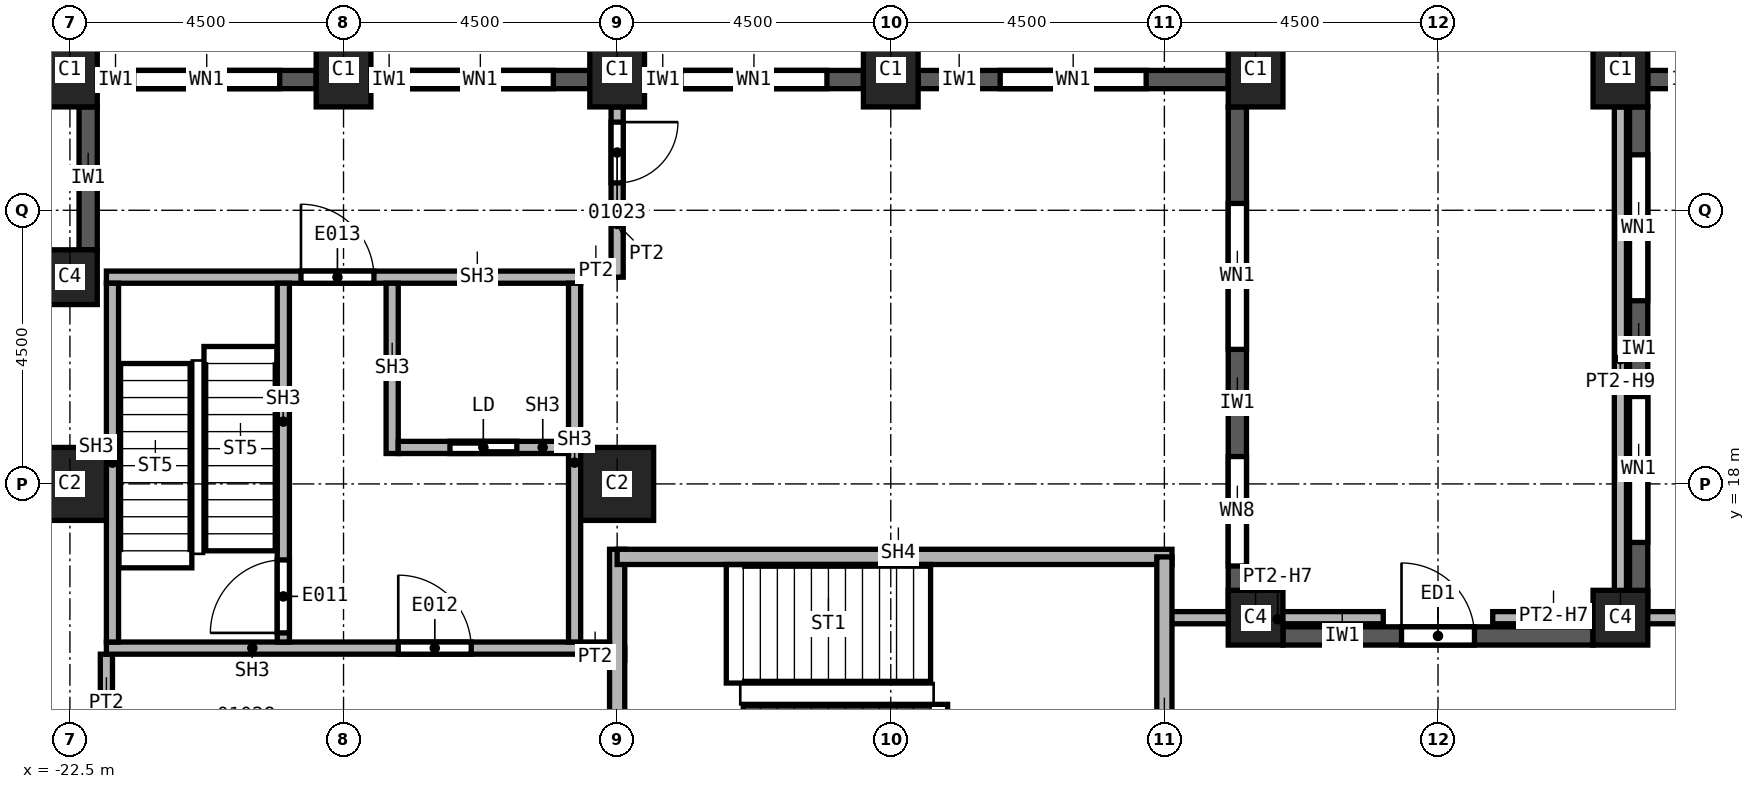
"""IFC4 building model, lengths in metres.
Left out: names, types, materials, properties, quantities, classifications, styles, units other than length and angle.
Written with IfcOpenShell. Run it as: python <this file> out.ifc"""

import sys

from ifc_helpers import new_model, si_unit, direction, frame, frame_2d, origin, origin_2d, place, context, subcontext, project, spatial, rectangle, extrude, element, fill, save


model = new_model("IFC4")
c1 = context("Model", 3, precision=1e-05, world=origin(), true_north=direction((0.0, 1.0)))
c2 = subcontext(c1, "Body", "Model", "MODEL_VIEW")
j1 = project(units=[si_unit("LENGTHUNIT", "METRE"), si_unit("PLANEANGLEUNIT", "RADIAN")], contexts=[c1])
p1 = place(None, origin())
s1 = spatial("IfcSite", under=j1, at=p1, CompositionType="ELEMENT")
p2 = place(p1, origin())
s2 = spatial("IfcBuilding", under=s1, at=p2, CompositionType="ELEMENT")
p3 = place(p2, frame((0.0, 0.0, 68.0)))
s3 = spatial("IfcBuildingStorey", under=s2, at=p3, CompositionType="ELEMENT", Elevation=68.0)
for number, where, z_axis, x_axis in (
    (1, (-13.5, 18.0, 0.0), (0.0, 0.0, 1.0), (1.0, 0.0, 0.0)),
    (2, (-22.5, 18.0, 0.0), (0.0, 0.0, 1.0), (1.0, 0.0, 0.0)),
):
    element("IfcColumn", number, at=place(p3, frame(where, z_axis=z_axis, x_axis=x_axis)), inside=s3, PredefinedType="COLUMN", context=c2, shape_type="SweptSolid", body=[
        extrude(rectangle(XDim=1.2, YDim=1.2, at=origin_2d()), origin(), (0.0, 0.0, 1.0), 3.7),
    ])
for number, where, z_axis, x_axis in (
    (3, (3.0, 24.8, 0.0), (0.0, 0.0, 1.0), (1.0, 0.0, 0.0)),
    (4, (-3.0, 24.8, 0.0), (0.0, 0.0, 1.0), (1.0, 0.0, 0.0)),
    (5, (-9.0, 24.8, 0.0), (0.0, 0.0, 1.0), (1.0, 0.0, 0.0)),
    (6, (-13.5, 24.8, 0.0), (0.0, 0.0, 1.0), (1.0, 0.0, 0.0)),
    (7, (-18.0, 24.8, 0.0), (0.0, 0.0, 1.0), (1.0, 0.0, 0.0)),
    (8, (-22.5, 24.8, 0.0), (0.0, 0.0, 1.0), (1.0, 0.0, 0.0)),
):
    element("IfcColumn", number, at=place(p3, frame(where, z_axis=z_axis, x_axis=x_axis)), inside=s3, PredefinedType="COLUMN", context=c2, shape_type="SweptSolid", body=[
        extrude(rectangle(XDim=0.9, YDim=1.2, at=origin_2d()), origin(), (0.0, 0.0, 1.0), 3.7),
    ])
for number, where, z_axis, x_axis in (
    (9, (3.0, 15.8, 0.0), (0.0, 0.0, 1.0), (1.0, 0.0, 0.0)),
    (10, (-3.0, 15.8, 0.0), (0.0, 0.0, 1.0), (1.0, 0.0, 0.0)),
    (11, (-22.5, 21.4, 0.0), (0.0, 0.0, 1.0), (1.0, 0.0, 0.0)),
):
    element("IfcColumn", number, at=place(p3, frame(where, z_axis=z_axis, x_axis=x_axis)), inside=s3, PredefinedType="COLUMN", context=c2, shape_type="SweptSolid", body=[
        extrude(rectangle(XDim=0.9, YDim=0.9, at=origin_2d()), origin(), (0.0, 0.0, 1.0), 3.7),
    ])
p4 = place(p3, frame((-22.2, 24.2, 0.0), z_axis=(0.0, 0.0, 1.0), x_axis=(0.0, -1.0, 0.0)))
e12 = element("IfcWall", 12, at=p4, inside=s3, PredefinedType="SOLIDWALL", context=c2, shape_type="SweptSolid", body=[
    extrude(rectangle(XDim=2.35, YDim=0.3, at=frame_2d((1.175, 0.0))), origin(), (0.0, 0.0, 1.0), 3.1),
])
p5 = place(p3, frame((8.55, 24.65, 0.0), z_axis=(0.0, 0.0, 1.0), x_axis=(-1.0, 0.0, 0.0)))
e13 = element("IfcWall", 13, at=p5, inside=s3, PredefinedType="SOLIDWALL", context=c2, shape_type="SweptSolid", body=[
    extrude(rectangle(XDim=5.1, YDim=0.3, at=frame_2d((2.55, 0.0))), origin(), (0.0, 0.0, 1.0), 3.1),
])
p6 = place(p5, frame((1.35, 0.0, 0.8)))
e14 = element("IfcOpeningElement", 14, at=p6, cuts=e13, PredefinedType="OPENING", context=c2, shape_type="SweptSolid", body=[
    extrude(rectangle(XDim=2.4, YDim=1.95, at=frame_2d((1.2, 0.975))), frame((0.0, 0.15, 0.0), z_axis=(0.0, -1.0, 0.0), x_axis=(1.0, 0.0, 0.0)), (0.0, 0.0, 1.0), 0.3),
])
p7 = place(p3, frame((3.3, 24.2, 0.0), z_axis=(0.0, 0.0, 1.0), x_axis=(0.0, -1.0, 0.0)))
e15 = element("IfcWall", 15, at=p7, inside=s3, PredefinedType="SOLIDWALL", context=c2, shape_type="SweptSolid", body=[
    extrude(rectangle(XDim=8.35, YDim=0.3, at=frame_2d((4.175, 0.0))), origin(), (0.0, 0.0, 1.0), 3.1),
])
p8 = place(p7, frame((0.788, 0.0, 0.8)))
e16 = element("IfcOpeningElement", 16, at=p8, cuts=e15, PredefinedType="OPENING", context=c2, shape_type="SweptSolid", body=[
    extrude(rectangle(XDim=2.4, YDim=1.95, at=frame_2d((1.2, 0.975))), frame((0.0, 0.15, 0.0), z_axis=(0.0, -1.0, 0.0), x_axis=(1.0, 0.0, 0.0)), (0.0, 0.0, 1.0), 0.3),
])
p9 = place(p7, frame((4.762, 0.0, 0.8)))
e17 = element("IfcOpeningElement", 17, at=p9, cuts=e15, PredefinedType="OPENING", context=c2, shape_type="SweptSolid", body=[
    extrude(rectangle(XDim=2.4, YDim=1.95, at=frame_2d((1.2, 0.975))), frame((0.0, 0.15, 0.0), z_axis=(0.0, -1.0, 0.0), x_axis=(1.0, 0.0, 0.0)), (0.0, 0.0, 1.0), 0.3),
])
p10 = place(p3, frame((-2.55, 15.5, 0.0), z_axis=(0.0, 0.0, 1.0), x_axis=(1.0, 0.0, 0.0)))
e18 = element("IfcWall", 18, at=p10, inside=s3, PredefinedType="SOLIDWALL", context=c2, shape_type="SweptSolid", body=[
    extrude(rectangle(XDim=5.1, YDim=0.3, at=frame_2d((2.55, 0.0))), origin(), (0.0, 0.0, 1.0), 3.1),
])
p11 = place(p10, frame((1.95, 0.0, 0.0)))
e19 = element("IfcOpeningElement", 19, at=p11, cuts=e18, PredefinedType="OPENING", context=c2, shape_type="SweptSolid", body=[
    extrude(rectangle(XDim=1.2, YDim=2.4, at=frame_2d((0.6, 1.2))), frame((0.0, 0.15, 0.0), z_axis=(0.0, -1.0, 0.0), x_axis=(1.0, 0.0, 0.0)), (0.0, 0.0, 1.0), 0.3),
])
p12 = place(p3, frame((-3.3, 15.85, 0.0), z_axis=(0.0, 0.0, 1.0), x_axis=(0.0, 1.0, 0.0)))
e20 = element("IfcWall", 20, at=p12, inside=s3, PredefinedType="SOLIDWALL", context=c2, shape_type="SweptSolid", body=[
    extrude(rectangle(XDim=8.35, YDim=0.3, at=frame_2d((4.175, 0.0))), origin(), (0.0, 0.0, 1.0), 3.1),
])
p13 = place(p12, frame((4.363, 0.0, 0.8)))
e21 = element("IfcOpeningElement", 21, at=p13, cuts=e20, PredefinedType="OPENING", context=c2, shape_type="SweptSolid", body=[
    extrude(rectangle(XDim=2.4, YDim=1.95, at=frame_2d((1.2, 0.975))), frame((0.0, 0.15, 0.0), z_axis=(0.0, -1.0, 0.0), x_axis=(1.0, 0.0, 0.0)), (0.0, 0.0, 1.0), 0.3),
])
p14 = place(p12, frame((0.8, 0.0, 0.8)))
e22 = element("IfcOpeningElement", 22, at=p14, cuts=e20, PredefinedType="OPENING", context=c2, shape_type="SweptSolid", body=[
    extrude(rectangle(XDim=1.8, YDim=1.95, at=frame_2d((0.9, 0.975))), frame((0.0, 0.15, 0.0), z_axis=(0.0, -1.0, 0.0), x_axis=(1.0, 0.0, 0.0)), (0.0, 0.0, 1.0), 0.3),
])
p15 = place(p3, frame((-3.45, 24.65, 0.0), z_axis=(0.0, 0.0, 1.0), x_axis=(-1.0, 0.0, 0.0)))
e23 = element("IfcWall", 23, at=p15, inside=s3, PredefinedType="SOLIDWALL", context=c2, shape_type="SweptSolid", body=[
    extrude(rectangle(XDim=5.1, YDim=0.3, at=frame_2d((2.55, 0.0))), origin(), (0.0, 0.0, 1.0), 3.1),
])
p16 = place(p15, frame((1.35, 0.0, 0.8)))
e24 = element("IfcOpeningElement", 24, at=p16, cuts=e23, PredefinedType="OPENING", context=c2, shape_type="SweptSolid", body=[
    extrude(rectangle(XDim=2.4, YDim=1.95, at=frame_2d((1.2, 0.975))), frame((0.0, 0.15, 0.0), z_axis=(0.0, -1.0, 0.0), x_axis=(1.0, 0.0, 0.0)), (0.0, 0.0, 1.0), 0.3),
])
p17 = place(p3, frame((-9.45, 24.65, 0.0), z_axis=(0.0, 0.0, 1.0), x_axis=(-1.0, 0.0, 0.0)))
e25 = element("IfcWall", 25, at=p17, inside=s3, PredefinedType="SOLIDWALL", context=c2, shape_type="SweptSolid", body=[
    extrude(rectangle(XDim=3.6, YDim=0.3, at=frame_2d((1.8, 0.0))), origin(), (0.0, 0.0, 1.0), 3.1),
])
p18 = place(p17, frame((0.6, 0.0, 0.8)))
e26 = element("IfcOpeningElement", 26, at=p18, cuts=e25, PredefinedType="OPENING", context=c2, shape_type="SweptSolid", body=[
    extrude(rectangle(XDim=2.4, YDim=1.95, at=frame_2d((1.2, 0.975))), frame((0.0, 0.15, 0.0), z_axis=(0.0, -1.0, 0.0), x_axis=(1.0, 0.0, 0.0)), (0.0, 0.0, 1.0), 0.3),
])
p19 = place(p3, frame((-13.95, 24.65, 0.0), z_axis=(0.0, 0.0, 1.0), x_axis=(-1.0, 0.0, 0.0)))
e27 = element("IfcWall", 27, at=p19, inside=s3, PredefinedType="SOLIDWALL", context=c2, shape_type="SweptSolid", body=[
    extrude(rectangle(XDim=3.6, YDim=0.3, at=frame_2d((1.8, 0.0))), origin(), (0.0, 0.0, 1.0), 3.1),
])
p20 = place(p19, frame((0.6, 0.0, 0.8)))
e28 = element("IfcOpeningElement", 28, at=p20, cuts=e27, PredefinedType="OPENING", context=c2, shape_type="SweptSolid", body=[
    extrude(rectangle(XDim=2.4, YDim=1.95, at=frame_2d((1.2, 0.975))), frame((0.0, 0.15, 0.0), z_axis=(0.0, -1.0, 0.0), x_axis=(1.0, 0.0, 0.0)), (0.0, 0.0, 1.0), 0.3),
])
p21 = place(p3, frame((-18.45, 24.65, 0.0), z_axis=(0.0, 0.0, 1.0), x_axis=(-1.0, 0.0, 0.0)))
e29 = element("IfcWall", 29, at=p21, inside=s3, PredefinedType="SOLIDWALL", context=c2, shape_type="SweptSolid", body=[
    extrude(rectangle(XDim=3.6, YDim=0.3, at=frame_2d((1.8, 0.0))), origin(), (0.0, 0.0, 1.0), 3.1),
])
p22 = place(p21, frame((0.6, 0.0, 0.8)))
e30 = element("IfcOpeningElement", 30, at=p22, cuts=e29, PredefinedType="OPENING", context=c2, shape_type="SweptSolid", body=[
    extrude(rectangle(XDim=2.4, YDim=1.95, at=frame_2d((1.2, 0.975))), frame((0.0, 0.15, 0.0), z_axis=(0.0, -1.0, 0.0), x_axis=(1.0, 0.0, 0.0)), (0.0, 0.0, 1.0), 0.3),
])
p23 = place(p3, frame((-21.9, 13.5, 0.0), z_axis=(0.0, 0.0, 1.0), x_axis=(0.0, 1.0, 0.0)))
e31 = element("IfcWall", 31, at=p23, inside=s3, PredefinedType="PARTITIONING", context=c2, shape_type="SweptSolid", body=[
    extrude(rectangle(XDim=1.7, YDim=0.2, at=frame_2d((0.85, 0.0))), origin(), (0.0, 0.0, 1.0), 3.7),
])
p24 = place(p3, frame((-14.1, 15.2, 0.0), z_axis=(0.0, 0.0, 1.0), x_axis=(1.0, 0.0, 0.0)))
e32 = element("IfcWall", 32, at=p24, inside=s3, PredefinedType="PARTITIONING", context=c2, shape_type="SweptSolid", body=[
    extrude(rectangle(XDim=0.725, YDim=0.2, at=frame_2d((0.363, 0.0))), origin(), (0.0, 0.0, 1.0), 3.7),
])
p25 = place(p3, frame((-13.5, 21.5, 0.0), z_axis=(0.0, 0.0, 1.0), x_axis=(-1.0, 0.0, 0.0)))
e33 = element("IfcWall", 33, at=p25, inside=s3, PredefinedType="PARTITIONING", context=c2, shape_type="SweptSolid", body=[
    extrude(rectangle(XDim=0.6, YDim=0.2, at=frame_2d((0.3, 0.0))), origin(), (0.0, 0.0, 1.0), 3.7),
])
p26 = place(p3, frame((-13.5, 24.2, 0.0), z_axis=(0.0, 0.0, 1.0), x_axis=(0.0, -1.0, 0.0)))
e34 = element("IfcWall", 34, at=p26, inside=s3, PredefinedType="PARTITIONING", context=c2, shape_type="SweptSolid", body=[
    extrude(rectangle(XDim=2.8, YDim=0.2, at=frame_2d((1.4, 0.0))), origin(), (0.0, 0.0, 1.0), 3.7),
])
p27 = place(p26, frame((0.25, 0.0, 0.0)))
e35 = element("IfcOpeningElement", 35, at=p27, cuts=e34, PredefinedType="OPENING", context=c2, shape_type="SweptSolid", body=[
    extrude(rectangle(XDim=1.0, YDim=2.1, at=frame_2d((0.5, 1.05))), frame((0.0, 0.1, 0.0), z_axis=(0.0, -1.0, 0.0), x_axis=(1.0, 0.0, 0.0)), (0.0, 0.0, 1.0), 0.2),
])
for number, where, z_axis, x_axis in (
    (36, (-4.5, 15.8, 0.0), (0.0, 0.0, 1.0), (1.0, 0.0, 0.0)),
    (37, (0.9, 15.8, 0.0), (0.0, 0.0, 1.0), (1.0, 0.0, 0.0)),
):
    element("IfcWall", number, at=place(p3, frame(where, z_axis=z_axis, x_axis=x_axis)), inside=s3, PredefinedType="PARTITIONING", context=c2, shape_type="SweptSolid", body=[
        extrude(rectangle(XDim=3.6, YDim=0.2, at=frame_2d((1.8, 0.0))), origin(), (0.0, 0.0, 1.0), 3.083),
    ])
p28 = place(p3, frame((3.0, 24.2, 0.0), z_axis=(0.0, 0.0, 1.0), x_axis=(0.0, -1.0, 0.0)))
e38 = element("IfcWall", 38, at=p28, inside=s3, PredefinedType="PARTITIONING", context=c2, shape_type="SweptSolid", body=[
    extrude(rectangle(XDim=8.4, YDim=0.2, at=frame_2d((4.2, 0.0))), origin(), (0.0, 0.0, 1.0), 2.854),
])
p29 = place(p3, frame((-13.5, 12.175, 0.0), z_axis=(0.0, 0.0, 1.0), x_axis=(0.0, 1.0, 0.0)))
e39 = element("IfcWall", 39, at=p29, inside=s3, PredefinedType="SOLIDWALL", context=c2, shape_type="SweptSolid", body=[
    extrude(rectangle(XDim=4.75, YDim=0.25, at=frame_2d((2.375, 0.0))), origin(), (0.0, 0.0, 1.0), 3.7),
])
p30 = place(p3, frame((-13.5, 16.8, 0.0), z_axis=(0.0, 0.0, 1.0), x_axis=(1.0, 0.0, 0.0)))
e40 = element("IfcWall", 40, at=p30, inside=s3, PredefinedType="SOLIDWALL", context=c2, shape_type="SweptSolid", body=[
    extrude(rectangle(XDim=9.125, YDim=0.25, at=frame_2d((4.562, 0.0))), origin(), (0.0, 0.0, 1.0), 3.7),
])
p31 = place(p3, frame((-4.5, 16.8, 0.0), z_axis=(0.0, 0.0, 1.0), x_axis=(0.0, -1.0, 0.0)))
e41 = element("IfcWall", 41, at=p31, inside=s3, PredefinedType="SOLIDWALL", context=c2, shape_type="SweptSolid", body=[
    extrude(rectangle(XDim=4.5, YDim=0.25, at=frame_2d((2.25, 0.0))), origin(), (0.0, 0.0, 1.0), 3.7),
])
p32 = place(p3, frame((-21.9, 15.3, 0.0), z_axis=(0.0, 0.0, 1.0), x_axis=(1.0, 0.0, 0.0)))
e42 = element("IfcWall", 42, at=p32, inside=s3, PredefinedType="SOLIDWALL", context=c2, shape_type="SweptSolid", body=[
    extrude(rectangle(XDim=8.275, YDim=0.2, at=frame_2d((4.137, 0.0))), origin(), (0.0, 0.0, 1.0), 3.7),
])
p33 = place(p32, frame((4.8, 0.0, 0.0)))
e43 = element("IfcOpeningElement", 43, at=p33, cuts=e42, PredefinedType="OPENING", context=c2, shape_type="SweptSolid", body=[
    extrude(rectangle(XDim=1.2, YDim=2.1, at=frame_2d((0.6, 1.05))), frame((0.0, 0.1, 0.0), z_axis=(0.0, -1.0, 0.0), x_axis=(1.0, 0.0, 0.0)), (0.0, 0.0, 1.0), 0.2),
])
p34 = place(p3, frame((-21.9, 21.4, 0.0), z_axis=(0.0, 0.0, 1.0), x_axis=(1.0, 0.0, 0.0)))
e44 = element("IfcWall", 44, at=p34, inside=s3, PredefinedType="SOLIDWALL", context=c2, shape_type="SweptSolid", body=[
    extrude(rectangle(XDim=7.8, YDim=0.2, at=frame_2d((3.9, 0.0))), origin(), (0.0, 0.0, 1.0), 3.7),
])
p35 = place(p34, frame((3.2, 0.0, 0.0)))
e45 = element("IfcOpeningElement", 45, at=p35, cuts=e44, PredefinedType="OPENING", context=c2, shape_type="SweptSolid", body=[
    extrude(rectangle(XDim=1.2, YDim=2.1, at=frame_2d((0.6, 1.05))), frame((0.0, 0.1, 0.0), z_axis=(0.0, -1.0, 0.0), x_axis=(1.0, 0.0, 0.0)), (0.0, 0.0, 1.0), 0.2),
])
for number, where, z_axis, x_axis in (
    (46, (-21.8, 15.4, 0.0), (0.0, 0.0, 1.0), (0.0, 1.0, 0.0)),
    (47, (-14.2, 15.4, 0.0), (0.0, 0.0, 1.0), (0.0, 1.0, 0.0)),
):
    element("IfcWall", number, at=place(p3, frame(where, z_axis=z_axis, x_axis=x_axis)), inside=s3, PredefinedType="SOLIDWALL", context=c2, shape_type="SweptSolid", body=[
        extrude(rectangle(XDim=5.9, YDim=0.2, at=frame_2d((2.95, 0.0))), origin(), (0.0, 0.0, 1.0), 3.7),
    ])
p36 = place(p3, frame((-18.99, 15.4, 0.0), z_axis=(0.0, 0.0, 1.0), x_axis=(0.0, 1.0, 0.0)))
e48 = element("IfcWall", 48, at=p36, inside=s3, PredefinedType="SOLIDWALL", context=c2, shape_type="SweptSolid", body=[
    extrude(rectangle(XDim=5.9, YDim=0.2, at=frame_2d((2.95, 0.0))), origin(), (0.0, 0.0, 1.0), 3.7),
])
p37 = place(p36, frame((0.15, 0.0, 0.0)))
e49 = element("IfcOpeningElement", 49, at=p37, cuts=e48, PredefinedType="OPENING", context=c2, shape_type="SweptSolid", body=[
    extrude(rectangle(XDim=1.2, YDim=2.1, at=frame_2d((0.6, 1.05))), frame((0.0, 0.1, 0.0), z_axis=(0.0, -1.0, 0.0), x_axis=(1.0, 0.0, 0.0)), (0.0, 0.0, 1.0), 0.2),
])
p38 = place(p3, frame((-17.2, 18.5, 0.0), z_axis=(0.0, 0.0, 1.0), x_axis=(0.0, 1.0, 0.0)))
e50 = element("IfcWall", 50, at=p38, inside=s3, PredefinedType="SOLIDWALL", context=c2, shape_type="SweptSolid", body=[
    extrude(rectangle(XDim=2.8, YDim=0.2, at=frame_2d((1.4, 0.0))), origin(), (0.0, 0.0, 1.0), 3.7),
])
p39 = place(p3, frame((-17.1, 18.6, 0.0), z_axis=(0.0, 0.0, 1.0), x_axis=(1.0, 0.0, 0.0)))
e51 = element("IfcWall", 51, at=p39, inside=s3, PredefinedType="SOLIDWALL", context=c2, shape_type="SweptSolid", body=[
    extrude(rectangle(XDim=2.8, YDim=0.2, at=frame_2d((1.4, 0.0))), origin(), (0.0, 0.0, 1.0), 3.7),
])
p40 = place(p39, frame((0.85, 0.0, 0.0)))
e52 = element("IfcOpeningElement", 52, at=p40, cuts=e51, PredefinedType="OPENING", context=c2, shape_type="SweptSolid", body=[
    extrude(rectangle(XDim=1.1, YDim=2.1, at=frame_2d((0.55, 1.05))), frame((0.0, 0.1, 0.0), z_axis=(0.0, -1.0, 0.0), x_axis=(1.0, 0.0, 0.0)), (0.0, 0.0, 1.0), 0.2),
])
p41 = place(p8, origin())
e53 = element("IfcWindow", 53, at=p41, inside=s3, PartitioningType="SINGLE_PANEL", PredefinedType="WINDOW", context=c2, shape_type="SweptSolid", body=[
    extrude(rectangle(XDim=2.4, YDim=1.95, at=frame_2d((1.2, 0.975))), frame((0.0, 0.03, 0.0), z_axis=(0.0, -1.0, 0.0), x_axis=(1.0, 0.0, 0.0)), (0.0, 0.0, 1.0), 0.06),
])
fill(e16, e53)
p42 = place(p9, origin())
e54 = element("IfcWindow", 54, at=p42, inside=s3, PartitioningType="SINGLE_PANEL", PredefinedType="WINDOW", context=c2, shape_type="SweptSolid", body=[
    extrude(rectangle(XDim=2.4, YDim=1.95, at=frame_2d((1.2, 0.975))), frame((0.0, 0.03, 0.0), z_axis=(0.0, -1.0, 0.0), x_axis=(1.0, 0.0, 0.0)), (0.0, 0.0, 1.0), 0.06),
])
fill(e17, e54)
p43 = place(p11, origin())
e55 = element("IfcDoor", 55, at=p43, inside=s3, OperationType="SINGLE_SWING_LEFT", PredefinedType="DOOR", context=c2, shape_type="SweptSolid", body=[
    extrude(rectangle(XDim=1.2, YDim=2.4, at=frame_2d((0.6, 1.2))), frame((0.0, 0.025, 0.0), z_axis=(0.0, -1.0, 0.0), x_axis=(1.0, 0.0, 0.0)), (0.0, 0.0, 1.0), 0.05),
])
fill(e19, e55)
p44 = place(p13, origin())
e56 = element("IfcWindow", 56, at=p44, inside=s3, PartitioningType="SINGLE_PANEL", PredefinedType="WINDOW", context=c2, shape_type="SweptSolid", body=[
    extrude(rectangle(XDim=2.4, YDim=1.95, at=frame_2d((1.2, 0.975))), frame((0.0, 0.03, 0.0), z_axis=(0.0, -1.0, 0.0), x_axis=(1.0, 0.0, 0.0)), (0.0, 0.0, 1.0), 0.06),
])
fill(e21, e56)
p45 = place(p16, origin())
e57 = element("IfcWindow", 57, at=p45, inside=s3, PartitioningType="SINGLE_PANEL", PredefinedType="WINDOW", context=c2, shape_type="SweptSolid", body=[
    extrude(rectangle(XDim=2.4, YDim=1.95, at=frame_2d((1.2, 0.975))), frame((0.0, 0.03, 0.0), z_axis=(0.0, -1.0, 0.0), x_axis=(1.0, 0.0, 0.0)), (0.0, 0.0, 1.0), 0.06),
])
fill(e24, e57)
p46 = place(p18, origin())
e58 = element("IfcWindow", 58, at=p46, inside=s3, PartitioningType="SINGLE_PANEL", PredefinedType="WINDOW", context=c2, shape_type="SweptSolid", body=[
    extrude(rectangle(XDim=2.4, YDim=1.95, at=frame_2d((1.2, 0.975))), frame((0.0, 0.03, 0.0), z_axis=(0.0, -1.0, 0.0), x_axis=(1.0, 0.0, 0.0)), (0.0, 0.0, 1.0), 0.06),
])
fill(e26, e58)
p47 = place(p20, origin())
e59 = element("IfcWindow", 59, at=p47, inside=s3, PartitioningType="SINGLE_PANEL", PredefinedType="WINDOW", context=c2, shape_type="SweptSolid", body=[
    extrude(rectangle(XDim=2.4, YDim=1.95, at=frame_2d((1.2, 0.975))), frame((0.0, 0.03, 0.0), z_axis=(0.0, -1.0, 0.0), x_axis=(1.0, 0.0, 0.0)), (0.0, 0.0, 1.0), 0.06),
])
fill(e28, e59)
p48 = place(p22, origin())
e60 = element("IfcWindow", 60, at=p48, inside=s3, PartitioningType="SINGLE_PANEL", PredefinedType="WINDOW", context=c2, shape_type="SweptSolid", body=[
    extrude(rectangle(XDim=2.4, YDim=1.95, at=frame_2d((1.2, 0.975))), frame((0.0, 0.03, 0.0), z_axis=(0.0, -1.0, 0.0), x_axis=(1.0, 0.0, 0.0)), (0.0, 0.0, 1.0), 0.06),
])
fill(e30, e60)
p49 = place(p27, origin())
e61 = element("IfcDoor", 61, at=p49, inside=s3, OperationType="SINGLE_SWING_RIGHT", PredefinedType="DOOR", context=c2, shape_type="SweptSolid", body=[
    extrude(rectangle(XDim=1.0, YDim=2.1, at=frame_2d((0.5, 1.05))), frame((0.0, 0.025, 0.0), z_axis=(0.0, -1.0, 0.0), x_axis=(1.0, 0.0, 0.0)), (0.0, 0.0, 1.0), 0.05),
])
fill(e35, e61)
p50 = place(p37, origin())
e62 = element("IfcDoor", 62, at=p50, inside=s3, OperationType="SINGLE_SWING_LEFT", PredefinedType="DOOR", context=c2, shape_type="SweptSolid", body=[
    extrude(rectangle(XDim=1.2, YDim=2.1, at=frame_2d((0.6, 1.05))), frame((0.0, 0.025, 0.0), z_axis=(0.0, -1.0, 0.0), x_axis=(1.0, 0.0, 0.0)), (0.0, 0.0, 1.0), 0.05),
])
fill(e49, e62)
p51 = place(p40, origin())
e63 = element("IfcDoor", 63, at=p51, inside=s3, OperationType="SLIDING_TO_LEFT", PredefinedType="DOOR", context=c2, shape_type="SweptSolid", body=[
    extrude(rectangle(XDim=1.1, YDim=2.1, at=frame_2d((0.55, 1.05))), frame((0.0, 0.025, 0.0), z_axis=(0.0, -1.0, 0.0), x_axis=(1.0, 0.0, 0.0)), (0.0, 0.0, 1.0), 0.05),
])
fill(e52, e63)
p52 = place(p33, origin())
e64 = element("IfcDoor", 64, at=p52, inside=s3, OperationType="SINGLE_SWING_RIGHT", PredefinedType="DOOR", context=c2, shape_type="SweptSolid", body=[
    extrude(rectangle(XDim=1.2, YDim=2.1, at=frame_2d((0.6, 1.05))), frame((0.0, 0.025, 0.0), z_axis=(0.0, -1.0, 0.0), x_axis=(1.0, 0.0, 0.0)), (0.0, 0.0, 1.0), 0.05),
])
fill(e43, e64)
p53 = place(p35, origin())
e65 = element("IfcDoor", 65, at=p53, inside=s3, OperationType="SINGLE_SWING_LEFT", PredefinedType="DOOR", context=c2, shape_type="SweptSolid", body=[
    extrude(rectangle(XDim=1.2, YDim=2.1, at=frame_2d((0.6, 1.05))), frame((0.0, 0.025, 0.0), z_axis=(0.0, -1.0, 0.0), x_axis=(1.0, 0.0, 0.0)), (0.0, 0.0, 1.0), 0.05),
])
fill(e45, e65)
p54 = place(p14, origin())
e66 = element("IfcWindow", 66, at=p54, inside=s3, PartitioningType="SINGLE_PANEL", PredefinedType="WINDOW", context=c2, shape_type="SweptSolid", body=[
    extrude(rectangle(XDim=1.8, YDim=1.95, at=frame_2d((0.9, 0.975))), frame((0.0, 0.03, 0.0), z_axis=(0.0, -1.0, 0.0), x_axis=(1.0, 0.0, 0.0)), (0.0, 0.0, 1.0), 0.06),
])
fill(e22, e66)
save(model, sys.argv[1])
